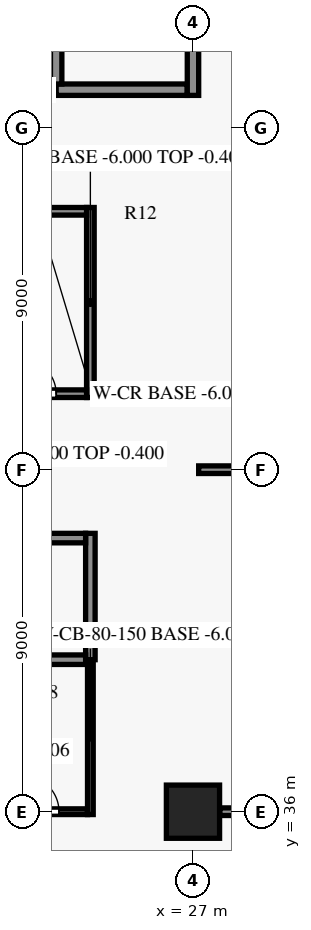
"""IFC4 building model, lengths in metres.
Left out: names, types, materials, properties, quantities, classifications, styles, units other than length and angle.
Written with IfcOpenShell. Run it as: python <this file> out.ifc"""

import sys

from ifc_helpers import new_model, si_unit, direction, frame, frame_2d, origin, origin_2d, place, context, subcontext, project, spatial, rectangle, extrude, element, fill, save


model = new_model("IFC4")
c1 = context("Model", 3, precision=1e-05, world=origin(), true_north=direction((0.0, 1.0)))
c2 = subcontext(c1, "Body", "Model", "MODEL_VIEW")
j1 = project(units=[si_unit("LENGTHUNIT", "METRE"), si_unit("PLANEANGLEUNIT", "RADIAN")], contexts=[c1])
p1 = place(None, origin())
s1 = spatial("IfcSite", under=j1, at=p1, CompositionType="ELEMENT")
p2 = place(p1, origin())
s2 = spatial("IfcBuilding", under=s1, at=p2, CompositionType="ELEMENT")
p3 = place(p2, frame((0.0, 0.0, -6.0)))
s3 = spatial("IfcBuildingStorey", under=s2, at=p3, CompositionType="ELEMENT", Elevation=-6.0)
p4 = place(p3, frame((27.0, 36.0, 0.0), z_axis=(0.0, 0.0, 1.0), x_axis=(1.0, 0.0, 0.0)))
e1 = element("IfcColumn", 1, at=p4, inside=s3, PredefinedType="COLUMN", context=c2, shape_type="SweptSolid", body=[
    extrude(rectangle(XDim=1.4, YDim=1.4, at=origin_2d()), origin(), (0.0, 0.0, 1.0), 6.0),
])
p5 = place(p3, frame((12.4, 36.0, 0.0), z_axis=(0.0, 0.0, 1.0), x_axis=(1.0, 0.0, 0.0)))
e2 = element("IfcWall", 2, at=p5, inside=s3, PredefinedType="SHEAR", context=c2, shape_type="SweptSolid", body=[
    extrude(rectangle(XDim=11.825, YDim=0.15, at=frame_2d((5.913, 0.0))), origin(), (0.0, 0.0, 1.0), 5.6),
])
p6 = place(p5, frame((1.05, 0.0, 0.0)))
e3 = element("IfcOpeningElement", 3, at=p6, cuts=e2, PredefinedType="OPENING", context=c2, shape_type="SweptSolid", body=[
    extrude(rectangle(XDim=0.9, YDim=2.1, at=frame_2d((0.45, 1.05))), frame((0.0, 0.085, 0.0), z_axis=(0.0, -1.0, 0.0), x_axis=(1.0, 0.0, 0.0)), (0.0, 0.0, 1.0), 0.17),
])
p7 = place(p5, frame((4.15, 0.0, 0.0)))
e4 = element("IfcOpeningElement", 4, at=p7, cuts=e2, PredefinedType="OPENING", context=c2, shape_type="SweptSolid", body=[
    extrude(rectangle(XDim=1.0, YDim=2.1, at=frame_2d((0.5, 1.05))), frame((0.0, 0.085, 0.0), z_axis=(0.0, -1.0, 0.0), x_axis=(1.0, 0.0, 0.0)), (0.0, 0.0, 1.0), 0.17),
])
p8 = place(p5, frame((7.35, 0.0, 0.0)))
e5 = element("IfcOpeningElement", 5, at=p8, cuts=e2, PredefinedType="OPENING", context=c2, shape_type="SweptSolid", body=[
    extrude(rectangle(XDim=0.9, YDim=2.1, at=frame_2d((0.45, 1.05))), frame((0.0, 0.085, 0.0), z_axis=(0.0, -1.0, 0.0), x_axis=(1.0, 0.0, 0.0)), (0.0, 0.0, 1.0), 0.17),
])
p9 = place(p5, frame((10.125, 0.0, 0.0)))
e6 = element("IfcOpeningElement", 6, at=p9, cuts=e2, PredefinedType="OPENING", context=c2, shape_type="SweptSolid", body=[
    extrude(rectangle(XDim=0.95, YDim=2.1, at=frame_2d((0.475, 1.05))), frame((0.0, 0.085, 0.0), z_axis=(0.0, -1.0, 0.0), x_axis=(1.0, 0.0, 0.0)), (0.0, 0.0, 1.0), 0.17),
])
for number, where, z_axis, x_axis in (
    (7, (8.1, 40.0, 0.0), (0.0, 0.0, 1.0), (1.0, 0.0, 0.0)),
    (8, (8.1, 43.2, 0.0), (0.0, 0.0, 1.0), (1.0, 0.0, 0.0)),
):
    element("IfcWall", number, at=place(p3, frame(where, z_axis=z_axis, x_axis=x_axis)), inside=s3, PredefinedType="SHEAR", context=c2, shape_type="SweptSolid", body=[
        extrude(rectangle(XDim=16.075, YDim=0.25, at=frame_2d((8.038, 0.0))), origin(), (0.0, 0.0, 1.0), 5.6),
    ])
p10 = place(p3, frame((21.6, 47.0, 0.0), z_axis=(0.0, 0.0, 1.0), x_axis=(1.0, 0.0, 0.0)))
e9 = element("IfcWall", 9, at=p10, inside=s3, PredefinedType="PARTITIONING", context=c2, shape_type="SweptSolid", body=[
    extrude(rectangle(XDim=2.6, YDim=0.2, at=frame_2d((1.3, 0.0))), origin(), (0.0, 0.0, 1.0), 5.6),
])
p11 = place(p10, frame((0.9, 0.0, 0.0)))
e10 = element("IfcOpeningElement", 10, at=p11, cuts=e9, PredefinedType="OPENING", context=c2, shape_type="SweptSolid", body=[
    extrude(rectangle(XDim=0.9, YDim=2.1, at=frame_2d((0.45, 1.05))), frame((0.0, 0.11, 0.0), z_axis=(0.0, -1.0, 0.0), x_axis=(1.0, 0.0, 0.0)), (0.0, 0.0, 1.0), 0.22),
])
p12 = place(p3, frame((21.6, 51.8, 0.0), z_axis=(0.0, 0.0, 1.0), x_axis=(1.0, 0.0, 0.0)))
e11 = element("IfcWall", 11, at=p12, inside=s3, PredefinedType="PARTITIONING", context=c2, shape_type="SweptSolid", body=[
    extrude(rectangle(XDim=2.6, YDim=0.2, at=frame_2d((1.3, 0.0))), origin(), (0.0, 0.0, 1.0), 5.6),
])
p13 = place(p3, frame((17.3, 55.0, 0.0), z_axis=(0.0, 0.0, 1.0), x_axis=(1.0, 0.0, 0.0)))
e12 = element("IfcWall", 12, at=p13, inside=s3, PredefinedType="PARTITIONING", context=c2, shape_type="SweptSolid", body=[
    extrude(rectangle(XDim=6.1, YDim=0.2, at=frame_2d((3.05, 0.0))), origin(), (0.0, 0.0, 1.0), 5.6),
])
p14 = place(p13, frame((2.55, 0.0, 0.0)))
e13 = element("IfcOpeningElement", 13, at=p14, cuts=e12, PredefinedType="OPENING", context=c2, shape_type="SweptSolid", body=[
    extrude(rectangle(XDim=1.0, YDim=2.1, at=frame_2d((0.5, 1.05))), frame((0.0, 0.11, 0.0), z_axis=(0.0, -1.0, 0.0), x_axis=(1.0, 0.0, 0.0)), (0.0, 0.0, 1.0), 0.22),
])
p15 = place(p3, frame((23.4, 55.0, 0.0), z_axis=(0.0, 0.0, 1.0), x_axis=(1.0, 0.0, 0.0)))
e14 = element("IfcWall", 14, at=p15, inside=s3, PredefinedType="SHEAR", context=c2, shape_type="SweptSolid", body=[
    extrude(rectangle(XDim=3.45, YDim=0.3, at=frame_2d((1.725, 0.0))), origin(), (0.0, 0.0, 1.0), 5.6),
])
p16 = place(p3, frame((23.4, 55.15, 0.0), z_axis=(0.0, 0.0, 1.0), x_axis=(0.0, 1.0, 0.0)))
e15 = element("IfcWall", 15, at=p16, inside=s3, PredefinedType="SHEAR", context=c2, shape_type="SweptSolid", body=[
    extrude(rectangle(XDim=8.0, YDim=0.3, at=frame_2d((4.0, 0.0))), origin(), (0.0, 0.0, 1.0), 5.6),
])
p17 = place(p3, frame((24.3, 35.925, 0.0), z_axis=(0.0, 0.0, 1.0), x_axis=(0.0, 1.0, 0.0)))
e16 = element("IfcWall", 16, at=p17, inside=s3, PredefinedType="SHEAR", context=c2, shape_type="SweptSolid", body=[
    extrude(rectangle(XDim=4.075, YDim=0.15, at=frame_2d((2.038, 0.0))), origin(), (0.0, 0.0, 1.0), 5.6),
])
p18 = place(p3, frame((24.3, 46.9, 0.0), z_axis=(0.0, 0.0, 1.0), x_axis=(0.0, 1.0, 0.0)))
e17 = element("IfcWall", 17, at=p18, inside=s3, PredefinedType="SHEAR", context=c2, shape_type="SweptSolid", body=[
    extrude(rectangle(XDim=5.0, YDim=0.2, at=frame_2d((2.5, 0.0))), origin(), (0.0, 0.0, 1.0), 5.6),
])
p19 = place(p3, frame((24.3, 40.0, 0.0), z_axis=(0.0, 0.0, 1.0), x_axis=(0.0, 1.0, 0.0)))
e18 = element("IfcWall", 18, at=p19, inside=s3, PredefinedType="SHEAR", context=c2, shape_type="SweptSolid", body=[
    extrude(rectangle(XDim=3.325, YDim=0.25, at=frame_2d((1.663, 0.0))), origin(), (0.0, 0.0, 1.0), 5.6),
])
p20 = place(p3, frame((27.0, 54.85, 0.0), z_axis=(0.0, 0.0, 1.0), x_axis=(0.0, 1.0, 0.0)))
e19 = element("IfcWall", 19, at=p20, inside=s3, PredefinedType="SHEAR", context=c2, shape_type="SweptSolid", body=[
    extrude(rectangle(XDim=8.35, YDim=0.3, at=frame_2d((4.175, 0.0))), origin(), (0.0, 0.0, 1.0), 5.6),
])
p21 = place(p20, frame((6.55, 0.0, 0.0)))
e20 = element("IfcOpeningElement", 20, at=p21, cuts=e19, PredefinedType="OPENING", context=c2, shape_type="SweptSolid", body=[
    extrude(rectangle(XDim=1.2, YDim=2.2, at=frame_2d((0.6, 1.1))), frame((0.0, 0.16, 0.0), z_axis=(0.0, -1.0, 0.0), x_axis=(1.0, 0.0, 0.0)), (0.0, 0.0, 1.0), 0.32),
])
p22 = place(p3, frame((27.705, 36.0, 0.0), z_axis=(0.0, 0.0, 1.0), x_axis=(1.0, 0.0, 0.0)))
e21 = element("IfcWall", 21, at=p22, inside=s3, PredefinedType="PARTITIONING", context=c2, shape_type="SweptSolid", body=[
    extrude(rectangle(XDim=7.59, YDim=0.2, at=frame_2d((3.795, 0.0))), origin(), (0.0, 0.0, 1.0), 5.58),
])
p23 = place(p22, frame((3.37, 0.0, 0.0)))
e22 = element("IfcOpeningElement", 22, at=p23, cuts=e21, PredefinedType="OPENING", context=c2, shape_type="SweptSolid", body=[
    extrude(rectangle(XDim=1.0, YDim=2.1, at=frame_2d((0.5, 1.05))), frame((0.0, 0.11, 0.0), z_axis=(0.0, -1.0, 0.0), x_axis=(1.0, 0.0, 0.0)), (0.0, 0.0, 1.0), 0.22),
])
p24 = place(p3, frame((27.15, 45.0, 0.0), z_axis=(0.0, 0.0, 1.0), x_axis=(1.0, 0.0, 0.0)))
e23 = element("IfcWall", 23, at=p24, inside=s3, PredefinedType="PARTITIONING", context=c2, shape_type="SweptSolid", body=[
    extrude(rectangle(XDim=8.145, YDim=0.2, at=frame_2d((4.073, 0.0))), origin(), (0.0, 0.0, 1.0), 5.58),
])
p25 = place(p11, origin())
e24 = element("IfcDoor", 24, at=p25, inside=s3, OperationType="SINGLE_SWING_LEFT", PredefinedType="DOOR", context=c2, shape_type="SweptSolid", body=[
    extrude(rectangle(XDim=0.9, YDim=2.1, at=frame_2d((0.45, 1.05))), frame((0.0, 0.025, 0.0), z_axis=(0.0, -1.0, 0.0), x_axis=(1.0, 0.0, 0.0)), (0.0, 0.0, 1.0), 0.05),
])
fill(e10, e24)
p26 = place(p9, origin())
e25 = element("IfcDoor", 25, at=p26, inside=s3, OperationType="SINGLE_SWING_LEFT", PredefinedType="DOOR", context=c2, shape_type="SweptSolid", body=[
    extrude(rectangle(XDim=0.95, YDim=2.1, at=frame_2d((0.475, 1.05))), frame((0.0, 0.025, 0.0), z_axis=(0.0, -1.0, 0.0), x_axis=(1.0, 0.0, 0.0)), (0.0, 0.0, 1.0), 0.05),
])
fill(e6, e25)
save(model, sys.argv[1])
